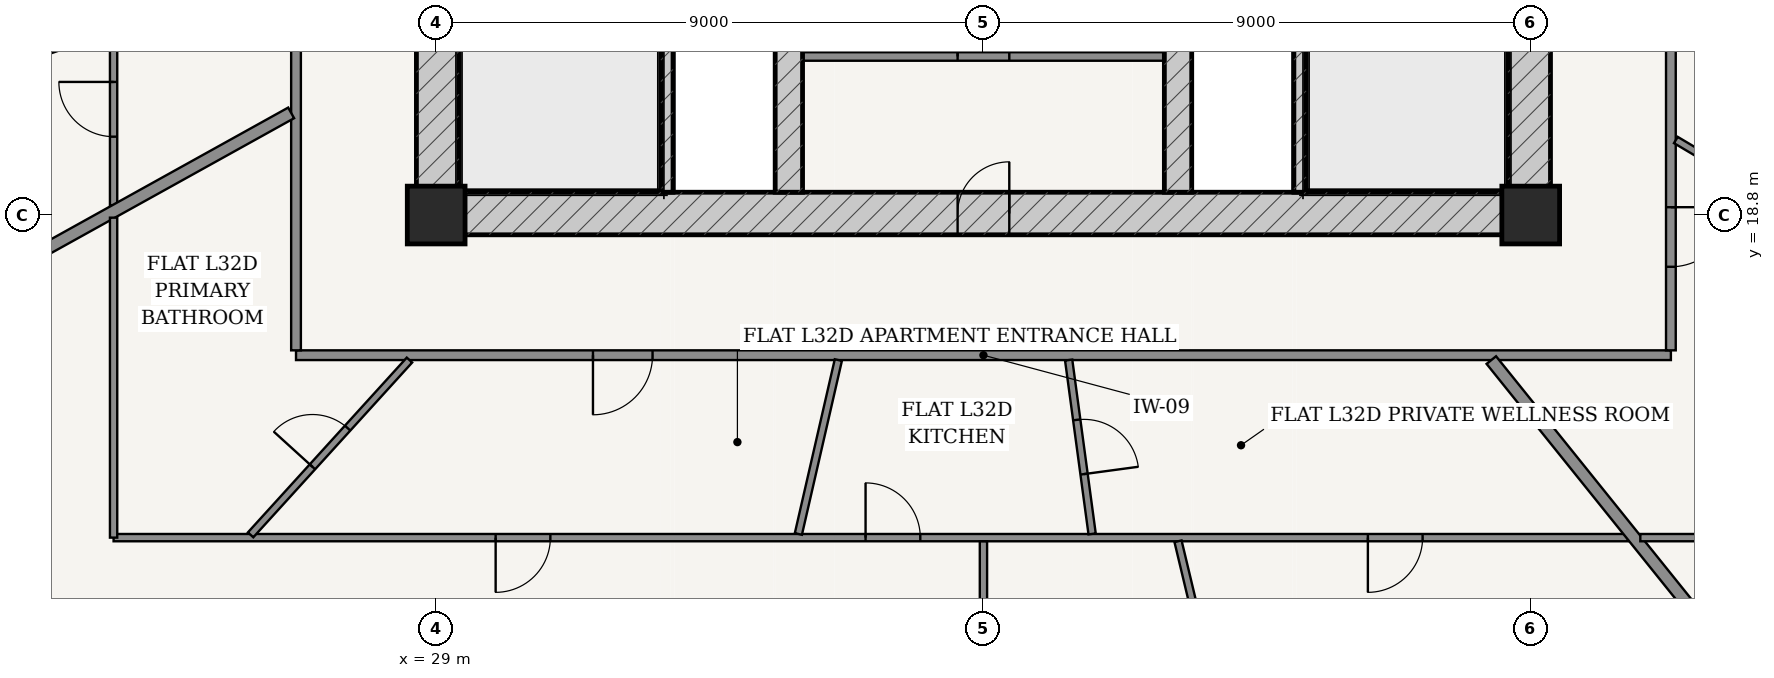
"""IFC4 building model, lengths in metres.
Left out: names, types, materials, properties, quantities, classifications, styles, units other than length and angle.
Written with IfcOpenShell. Run it as: python <this file> out.ifc"""

import sys

from ifc_helpers import new_model, si_unit, direction, frame, frame_2d, origin, origin_2d, place, context, subcontext, project, spatial, rectangle, extrude, source, transform, mapped, element, fill, save


model = new_model("IFC4")
c1 = context("Model", 3, precision=1e-05, world=origin(), true_north=direction((-0.2419218956, 0.970295726276)))
c2 = subcontext(c1, "Body", "Model", "MODEL_VIEW")
j1 = project(units=[si_unit("LENGTHUNIT", "METRE"), si_unit("PLANEANGLEUNIT", "RADIAN")], contexts=[c1])
p1 = place(None, origin())
s1 = spatial("IfcSite", under=j1, at=p1, CompositionType="ELEMENT")
p2 = place(p1, origin())
s2 = spatial("IfcBuilding", under=s1, at=p2, CompositionType="ELEMENT")
p3 = place(p2, frame((0.0, 0.0, 123.0)))
s3 = spatial("IfcBuildingStorey", under=s2, at=p3, CompositionType="ELEMENT", Elevation=123.0)
for number, where, z_axis, x_axis in (
    (1, (29.0, 18.8, 0.0), (0.0, 0.0, 1.0), (1.0, 0.0, 0.0)),
    (2, (47.0, 18.8, 0.0), (0.0, 0.0, 1.0), (1.0, 0.0, 0.0)),
):
    element("IfcColumn", number, at=place(p3, frame(where, z_axis=z_axis, x_axis=x_axis)), inside=s3, PredefinedType="COLUMN", context=c2, shape_type="SweptSolid", body=[
        extrude(rectangle(XDim=0.95, YDim=0.95, at=origin_2d()), origin(), (0.0, 0.0, 1.0), 3.6),
    ])
p4 = place(p3, frame((28.675, 18.825, 0.0), z_axis=(0.0, 0.0, 1.0), x_axis=(1.0, 0.0, 0.0)))
e3 = element("IfcWall", 3, at=p4, inside=s3, PredefinedType="SHEAR", context=c2, shape_type="SweptSolid", body=[
    extrude(rectangle(XDim=18.65, YDim=0.7, at=frame_2d((9.325, 0.0))), origin(), (0.0, 0.0, 1.0), 3.325),
])
p5 = place(p4, frame((8.9, 0.0, 0.0)))
e4 = element("IfcOpeningElement", 4, at=p5, cuts=e3, PredefinedType="OPENING", context=c2, shape_type="SweptSolid", body=[
    extrude(rectangle(XDim=0.85, YDim=2.1, at=frame_2d((0.425, 1.05))), frame((0.0, 0.36, 0.0), z_axis=(0.0, -1.0, 0.0), x_axis=(1.0, 0.0, 0.0)), (0.0, 0.0, 1.0), 0.72),
])
p6 = place(p3, frame((29.025, 19.175, 0.0), z_axis=(0.0, 0.0, 1.0), x_axis=(0.0, 1.0, 0.0)))
e5 = element("IfcWall", 5, at=p6, inside=s3, PredefinedType="SHEAR", context=c2, shape_type="SweptSolid", body=[
    extrude(rectangle(XDim=15.25, YDim=0.7, at=frame_2d((7.625, 0.0))), origin(), (0.0, 0.0, 1.0), 3.325),
])
p7 = place(p6, frame((9.875, 0.0, 0.0)))
e6 = element("IfcOpeningElement", 6, at=p7, cuts=e5, PredefinedType="OPENING", context=c2, shape_type="SweptSolid", body=[
    extrude(rectangle(XDim=1.5, YDim=2.2, at=frame_2d((0.75, 1.1))), frame((0.0, 0.36, 0.0), z_axis=(0.0, -1.0, 0.0), x_axis=(1.0, 0.0, 0.0)), (0.0, 0.0, 1.0), 0.72),
])
p8 = place(p3, frame((46.975, 19.175, 0.0), z_axis=(0.0, 0.0, 1.0), x_axis=(0.0, 1.0, 0.0)))
e7 = element("IfcWall", 7, at=p8, inside=s3, PredefinedType="SHEAR", context=c2, shape_type="SweptSolid", body=[
    extrude(rectangle(XDim=15.25, YDim=0.7, at=frame_2d((7.625, 0.0))), origin(), (0.0, 0.0, 1.0), 3.325),
])
p9 = place(p8, frame((9.875, 0.0, 0.0)))
e8 = element("IfcOpeningElement", 8, at=p9, cuts=e7, PredefinedType="OPENING", context=c2, shape_type="SweptSolid", body=[
    extrude(rectangle(XDim=1.5, YDim=2.2, at=frame_2d((0.75, 1.1))), frame((0.0, 0.36, 0.0), z_axis=(0.0, -1.0, 0.0), x_axis=(1.0, 0.0, 0.0)), (0.0, 0.0, 1.0), 0.72),
])
for number, where, z_axis, x_axis in (
    (9, (32.795, 19.175, 0.0), (0.0, 0.0, 1.0), (0.0, 1.0, 0.0)),
    (10, (43.205, 19.175, 0.0), (0.0, 0.0, 1.0), (0.0, 1.0, 0.0)),
):
    element("IfcWall", number, at=place(p3, frame(where, z_axis=z_axis, x_axis=x_axis)), inside=s3, PredefinedType="SOLIDWALL", context=c2, shape_type="SweptSolid", body=[
        extrude(rectangle(XDim=7.375, YDim=0.2, at=frame_2d((3.688, 0.0))), origin(), (0.0, 0.0, 1.0), 3.325),
    ])
p10 = place(p3, frame((34.8, 19.175, 0.0), z_axis=(0.0, 0.0, 1.0), x_axis=(0.0, 1.0, 0.0)))
e11 = element("IfcWall", 11, at=p10, inside=s3, PredefinedType="SHEAR", context=c2, shape_type="SweptSolid", body=[
    extrude(rectangle(XDim=15.25, YDim=0.45, at=frame_2d((7.625, 0.0))), origin(), (0.0, 0.0, 1.0), 3.325),
])
p11 = place(p10, frame((7.8, 0.0, 0.0)))
e12 = element("IfcOpeningElement", 12, at=p11, cuts=e11, PredefinedType="OPENING", context=c2, shape_type="SweptSolid", body=[
    extrude(rectangle(XDim=1.05, YDim=2.15, at=frame_2d((0.525, 1.075))), frame((0.0, 0.235, 0.0), z_axis=(0.0, -1.0, 0.0), x_axis=(1.0, 0.0, 0.0)), (0.0, 0.0, 1.0), 0.47),
])
p12 = place(p3, frame((41.2, 19.175, 0.0), z_axis=(0.0, 0.0, 1.0), x_axis=(0.0, 1.0, 0.0)))
e13 = element("IfcWall", 13, at=p12, inside=s3, PredefinedType="SHEAR", context=c2, shape_type="SweptSolid", body=[
    extrude(rectangle(XDim=15.25, YDim=0.45, at=frame_2d((7.625, 0.0))), origin(), (0.0, 0.0, 1.0), 3.325),
])
p13 = place(p12, frame((7.8, 0.0, 0.0)))
e14 = element("IfcOpeningElement", 14, at=p13, cuts=e13, PredefinedType="OPENING", context=c2, shape_type="SweptSolid", body=[
    extrude(rectangle(XDim=1.05, YDim=2.15, at=frame_2d((0.525, 1.075))), frame((0.0, 0.235, 0.0), z_axis=(0.0, -1.0, 0.0), x_axis=(1.0, 0.0, 0.0)), (0.0, 0.0, 1.0), 0.47),
])
p14 = place(p3, frame((15.846, 14.59, 0.0), z_axis=(0.0, 0.0, 1.0), x_axis=(0.769254958887, -0.638941944333, 0.0)))
e15 = element("IfcWall", 15, at=p14, inside=s3, PredefinedType="SOLIDWALL", context=c2, shape_type="SweptSolid", body=[
    extrude(rectangle(XDim=9.69, YDim=0.26, at=frame_2d((4.845, 0.0))), origin(), (0.0, 0.0, 1.0), 3.325),
])
p15 = place(p14, frame((4.17, 0.0, 0.0)))
e16 = element("IfcOpeningElement", 16, at=p15, cuts=e15, PredefinedType="OPENING", context=c2, shape_type="SweptSolid", body=[
    extrude(rectangle(XDim=1.35, YDim=2.2, at=frame_2d((0.675, 1.1))), frame((0.0, 0.14, 0.0), z_axis=(0.0, -1.0, 0.0), x_axis=(1.0, 0.0, 0.0)), (0.0, 0.0, 1.0), 0.28),
])
p16 = place(p3, frame((35.025, 21.407, 0.0), z_axis=(0.0, 0.0, 1.0), x_axis=(1.0, 0.0, 0.0)))
e17 = element("IfcWall", 17, at=p16, inside=s3, PredefinedType="PARTITIONING", context=c2, shape_type="SweptSolid", body=[
    extrude(rectangle(XDim=5.95, YDim=0.14, at=frame_2d((2.975, 0.0))), origin(), (0.0, 0.0, 1.0), 3.325),
])
p17 = place(p16, frame((2.55, 0.0, 0.0)))
e18 = element("IfcOpeningElement", 18, at=p17, cuts=e17, PredefinedType="OPENING", context=c2, shape_type="SweptSolid", body=[
    extrude(rectangle(XDim=0.85, YDim=2.1, at=frame_2d((0.425, 1.05))), frame((0.0, 0.08, 0.0), z_axis=(0.0, -1.0, 0.0), x_axis=(1.0, 0.0, 0.0)), (0.0, 0.0, 1.0), 0.16),
])
p18 = place(p3, frame((26.695, 16.495, 0.0), z_axis=(0.0, 0.0, 1.0), x_axis=(1.0, 0.0, 0.0)))
e19 = element("IfcWall", 19, at=p18, inside=s3, PredefinedType="PARTITIONING", context=c2, shape_type="SweptSolid", body=[
    extrude(rectangle(XDim=22.61, YDim=0.16, at=frame_2d((11.305, 0.0))), origin(), (0.0, 0.0, 1.0), 2.767),
])
p19 = place(p18, frame((4.883, 0.0, 0.0)))
e20 = element("IfcOpeningElement", 20, at=p19, cuts=e19, PredefinedType="OPENING", context=c2, shape_type="SweptSolid", body=[
    extrude(rectangle(XDim=0.98, YDim=2.2, at=frame_2d((0.49, 1.1))), frame((0.0, 0.09, 0.0), z_axis=(0.0, -1.0, 0.0), x_axis=(1.0, 0.0, 0.0)), (0.0, 0.0, 1.0), 0.18),
])
p20 = place(p3, frame((26.695, 16.575, 0.0), z_axis=(0.0, 0.0, 1.0), x_axis=(0.0, 1.0, 0.0)))
e21 = element("IfcWall", 21, at=p20, inside=s3, PredefinedType="PARTITIONING", context=c2, shape_type="SweptSolid", body=[
    extrude(rectangle(XDim=20.45, YDim=0.16, at=frame_2d((10.225, 0.0))), origin(), (0.0, 0.0, 1.0), 2.767),
])
p21 = place(p20, frame((9.547, 0.0, 0.0)))
e22 = element("IfcOpeningElement", 22, at=p21, cuts=e21, PredefinedType="OPENING", context=c2, shape_type="SweptSolid", body=[
    extrude(rectangle(XDim=0.98, YDim=2.2, at=frame_2d((0.49, 1.1))), frame((0.0, 0.09, 0.0), z_axis=(0.0, -1.0, 0.0), x_axis=(1.0, 0.0, 0.0)), (0.0, 0.0, 1.0), 0.18),
])
p22 = place(p3, frame((49.305, 16.575, 0.0), z_axis=(0.0, 0.0, 1.0), x_axis=(0.0, 1.0, 0.0)))
e23 = element("IfcWall", 23, at=p22, inside=s3, PredefinedType="PARTITIONING", context=c2, shape_type="SweptSolid", body=[
    extrude(rectangle(XDim=20.45, YDim=0.16, at=frame_2d((10.225, 0.0))), origin(), (0.0, 0.0, 1.0), 2.767),
])
p23 = place(p22, frame((17.66, 0.0, 0.0)))
e24 = element("IfcOpeningElement", 24, at=p23, cuts=e23, PredefinedType="OPENING", context=c2, shape_type="SweptSolid", body=[
    extrude(rectangle(XDim=0.98, YDim=2.2, at=frame_2d((0.49, 1.1))), frame((0.0, 0.09, 0.0), z_axis=(0.0, -1.0, 0.0), x_axis=(1.0, 0.0, 0.0)), (0.0, 0.0, 1.0), 0.18),
])
p24 = place(p22, frame((1.374, 0.0, 0.0)))
e25 = element("IfcOpeningElement", 25, at=p24, cuts=e23, PredefinedType="OPENING", context=c2, shape_type="SweptSolid", body=[
    extrude(rectangle(XDim=0.98, YDim=2.2, at=frame_2d((0.49, 1.1))), frame((0.0, 0.09, 0.0), z_axis=(0.0, -1.0, 0.0), x_axis=(1.0, 0.0, 0.0)), (0.0, 0.0, 1.0), 0.18),
])
p25 = place(p3, frame((23.695, 18.961, 0.0), z_axis=(0.0, 0.0, 1.0), x_axis=(0.0, 1.0, 0.0)))
e26 = element("IfcWall", 26, at=p25, inside=s3, PredefinedType="PARTITIONING", context=c2, shape_type="SweptSolid", body=[
    extrude(rectangle(XDim=15.679, YDim=0.12, at=frame_2d((7.839, 0.0))), origin(), (0.0, 0.0, 1.0), 2.767),
])
p26 = place(p25, frame((7.625, 0.0, 0.0)))
e27 = element("IfcOpeningElement", 27, at=p26, cuts=e26, PredefinedType="OPENING", context=c2, shape_type="SweptSolid", body=[
    extrude(rectangle(XDim=0.9, YDim=2.15, at=frame_2d((0.45, 1.075))), frame((0.0, 0.07, 0.0), z_axis=(0.0, -1.0, 0.0), x_axis=(1.0, 0.0, 0.0)), (0.0, 0.0, 1.0), 0.14),
])
p27 = place(p25, frame((1.128, 0.0, 0.0)))
e28 = element("IfcOpeningElement", 28, at=p27, cuts=e26, PredefinedType="OPENING", context=c2, shape_type="SweptSolid", body=[
    extrude(rectangle(XDim=0.9, YDim=2.15, at=frame_2d((0.45, 1.075))), frame((0.0, 0.07, 0.0), z_axis=(0.0, -1.0, 0.0), x_axis=(1.0, 0.0, 0.0)), (0.0, 0.0, 1.0), 0.14),
])
p28 = place(p3, frame((23.636, 21.857, 0.0), z_axis=(0.0, 0.0, 1.0), x_axis=(-0.945571197348, -0.325415289661, 0.0)))
e29 = element("IfcWall", 29, at=p28, inside=s3, PredefinedType="PARTITIONING", context=c2, shape_type="SweptSolid", body=[
    extrude(rectangle(XDim=10.737, YDim=0.12, at=frame_2d((5.368, 0.0))), origin(), (0.0, 0.0, 1.0), 2.767),
])
p29 = place(p28, frame((4.918, 0.0, 0.0)))
e30 = element("IfcOpeningElement", 30, at=p29, cuts=e29, PredefinedType="OPENING", context=c2, shape_type="SweptSolid", body=[
    extrude(rectangle(XDim=0.9, YDim=2.15, at=frame_2d((0.45, 1.075))), frame((0.0, 0.07, 0.0), z_axis=(0.0, -1.0, 0.0), x_axis=(1.0, 0.0, 0.0)), (0.0, 0.0, 1.0), 0.14),
])
p30 = place(p3, frame((26.615, 20.48, 0.0), z_axis=(0.0, 0.0, 1.0), x_axis=(-0.874310671773, -0.48536671623, 0.0)))
e31 = element("IfcWall", 31, at=p30, inside=s3, PredefinedType="PARTITIONING", context=c2, shape_type="SweptSolid", body=[
    extrude(rectangle(XDim=12.159, YDim=0.2, at=frame_2d((6.079, 0.0))), origin(), (0.0, 0.0, 1.0), 2.767),
])
p31 = place(p3, frame((48.598, 13.495, 0.0), z_axis=(0.0, 0.0, 1.0), x_axis=(-1.0, 0.0, 0.0)))
e32 = element("IfcWall", 32, at=p31, inside=s3, PredefinedType="PARTITIONING", context=c2, shape_type="SweptSolid", body=[
    extrude(rectangle(XDim=24.903, YDim=0.12, at=frame_2d((12.452, 0.0))), origin(), (0.0, 0.0, 1.0), 2.767),
])
p32 = place(p31, frame((17.72, 0.0, 0.0)))
e33 = element("IfcOpeningElement", 33, at=p32, cuts=e32, PredefinedType="OPENING", context=c2, shape_type="SweptSolid", body=[
    extrude(rectangle(XDim=0.9, YDim=2.15, at=frame_2d((0.45, 1.075))), frame((0.0, 0.07, 0.0), z_axis=(0.0, -1.0, 0.0), x_axis=(1.0, 0.0, 0.0)), (0.0, 0.0, 1.0), 0.14),
])
p33 = place(p31, frame((11.637, 0.0, 0.0)))
e34 = element("IfcOpeningElement", 34, at=p33, cuts=e32, PredefinedType="OPENING", context=c2, shape_type="SweptSolid", body=[
    extrude(rectangle(XDim=0.9, YDim=2.15, at=frame_2d((0.45, 1.075))), frame((0.0, 0.07, 0.0), z_axis=(0.0, -1.0, 0.0), x_axis=(1.0, 0.0, 0.0)), (0.0, 0.0, 1.0), 0.14),
])
p34 = place(p31, frame((3.376, 0.0, 0.0)))
e35 = element("IfcOpeningElement", 35, at=p34, cuts=e32, PredefinedType="OPENING", context=c2, shape_type="SweptSolid", body=[
    extrude(rectangle(XDim=0.9, YDim=2.15, at=frame_2d((0.45, 1.075))), frame((0.0, 0.07, 0.0), z_axis=(0.0, -1.0, 0.0), x_axis=(1.0, 0.0, 0.0)), (0.0, 0.0, 1.0), 0.14),
])
p35 = place(p3, frame((23.695, 13.495, 0.0), z_axis=(0.0, 0.0, 1.0), x_axis=(0.0, 1.0, 0.0)))
e36 = element("IfcWall", 36, at=p35, inside=s3, PredefinedType="PARTITIONING", context=c2, shape_type="SweptSolid", body=[
    extrude(rectangle(XDim=5.261, YDim=0.12, at=frame_2d((2.631, 0.0))), origin(), (0.0, 0.0, 1.0), 3.004),
])
p36 = place(p3, frame((38.0, 13.433, 0.0), z_axis=(0.0, 0.0, 1.0), x_axis=(0.0, -1.0, 0.0)))
e37 = element("IfcWall", 37, at=p36, inside=s3, PredefinedType="PARTITIONING", context=c2, shape_type="SweptSolid", body=[
    extrude(rectangle(XDim=8.673, YDim=0.12, at=frame_2d((4.336, 0.0))), origin(), (0.0, 0.0, 1.0), 2.767),
])
p37 = place(p36, frame((3.886, 0.0, 0.0)))
e38 = element("IfcOpeningElement", 38, at=p37, cuts=e37, PredefinedType="OPENING", context=c2, shape_type="SweptSolid", body=[
    extrude(rectangle(XDim=0.9, YDim=2.15, at=frame_2d((0.45, 1.075))), frame((0.0, 0.07, 0.0), z_axis=(0.0, -1.0, 0.0), x_axis=(1.0, 0.0, 0.0)), (0.0, 0.0, 1.0), 0.14),
])
p38 = place(p3, frame((41.2, 13.435, 0.0), z_axis=(0.0, 0.0, 1.0), x_axis=(0.232814779051, -0.972521094196, 0.0)))
e39 = element("IfcWall", 39, at=p38, inside=s3, PredefinedType="PARTITIONING", context=c2, shape_type="SweptSolid", body=[
    extrude(rectangle(XDim=8.438, YDim=0.12, at=frame_2d((4.219, 0.0))), origin(), (0.0, 0.0, 1.0), 2.767),
])
p39 = place(p3, frame((28.561, 16.415, 0.0), z_axis=(0.0, 0.0, 1.0), x_axis=(-0.672578928456, -0.740025394833, 0.0)))
e40 = element("IfcWall", 40, at=p39, inside=s3, PredefinedType="PARTITIONING", context=c2, shape_type="SweptSolid", body=[
    extrude(rectangle(XDim=3.884, YDim=0.12, at=frame_2d((1.942, 0.0))), origin(), (0.0, 0.0, 1.0), 2.767),
])
p40 = place(p39, frame((1.512, 0.0, 0.0)))
e41 = element("IfcOpeningElement", 41, at=p40, cuts=e40, PredefinedType="OPENING", context=c2, shape_type="SweptSolid", body=[
    extrude(rectangle(XDim=0.86, YDim=2.15, at=frame_2d((0.43, 1.075))), frame((0.0, 0.07, 0.0), z_axis=(0.0, -1.0, 0.0), x_axis=(1.0, 0.0, 0.0)), (0.0, 0.0, 1.0), 0.14),
])
p41 = place(p3, frame((35.614, 16.415, 0.0), z_axis=(0.0, 0.0, 1.0), x_axis=(-0.223911395669, -0.974609504822, 0.0)))
e42 = element("IfcWall", 42, at=p41, inside=s3, PredefinedType="PARTITIONING", context=c2, shape_type="SweptSolid", body=[
    extrude(rectangle(XDim=2.934, YDim=0.12, at=frame_2d((1.467, 0.0))), origin(), (0.0, 0.0, 1.0), 2.767),
])
p42 = place(p3, frame((39.401, 16.415, 0.0), z_axis=(0.0, 0.0, 1.0), x_axis=(0.133726943496, -0.99101821607, 0.0)))
e43 = element("IfcWall", 43, at=p42, inside=s3, PredefinedType="PARTITIONING", context=c2, shape_type="SweptSolid", body=[
    extrude(rectangle(XDim=2.885, YDim=0.12, at=frame_2d((1.442, 0.0))), origin(), (0.0, 0.0, 1.0), 3.325),
])
p43 = place(p42, frame((0.992, 0.0, 0.0)))
e44 = element("IfcOpeningElement", 44, at=p43, cuts=e43, PredefinedType="OPENING", context=c2, shape_type="SweptSolid", body=[
    extrude(rectangle(XDim=0.9, YDim=2.15, at=frame_2d((0.45, 1.075))), frame((0.0, 0.07, 0.0), z_axis=(0.0, -1.0, 0.0), x_axis=(1.0, 0.0, 0.0)), (0.0, 0.0, 1.0), 0.14),
])
p44 = place(p3, frame((46.352, 16.415, 0.0), z_axis=(0.0, 0.0, 1.0), x_axis=(0.626701127389, -0.779259710834, 0.0)))
e45 = element("IfcWall", 45, at=p44, inside=s3, PredefinedType="PARTITIONING", context=c2, shape_type="SweptSolid", body=[
    extrude(rectangle(XDim=10.141, YDim=0.2, at=frame_2d((5.071, 0.0))), origin(), (0.0, 0.0, 1.0), 2.767),
])
p45 = place(p3, frame((52.305, 13.495, 0.0), z_axis=(0.0, 0.0, 1.0), x_axis=(-1.0, 0.0, 0.0)))
e46 = element("IfcWall", 46, at=p45, inside=s3, PredefinedType="PARTITIONING", context=c2, shape_type="SweptSolid", body=[
    extrude(rectangle(XDim=3.503, YDim=0.12, at=frame_2d((1.751, 0.0))), origin(), (0.0, 0.0, 1.0), 2.767),
])
p46 = place(p3, frame((49.387, 20.034, 0.0), z_axis=(0.0, 0.0, 1.0), x_axis=(0.859682842925, -0.510828160521, 0.0)))
e47 = element("IfcWall", 47, at=p46, inside=s3, PredefinedType="PARTITIONING", context=c2, shape_type="SweptSolid", body=[
    extrude(rectangle(XDim=3.333, YDim=0.12, at=frame_2d((1.666, 0.0))), origin(), (0.0, 0.0, 1.0), 3.325),
])
p47 = place(p46, frame((1.236, 0.0, 0.0)))
e48 = element("IfcOpeningElement", 48, at=p47, cuts=e47, PredefinedType="OPENING", context=c2, shape_type="SweptSolid", body=[
    extrude(rectangle(XDim=0.86, YDim=2.15, at=frame_2d((0.43, 1.075))), frame((0.0, 0.07, 0.0), z_axis=(0.0, -1.0, 0.0), x_axis=(1.0, 0.0, 0.0)), (0.0, 0.0, 1.0), 0.14),
])
m1 = source(origin(), c2, "Body", "SweptSolid", [
    extrude(rectangle(XDim=0.85, YDim=2.1, at=frame_2d((0.425, 1.05))), frame((0.0, 0.025, 0.0), z_axis=(0.0, -1.0, 0.0), x_axis=(1.0, 0.0, 0.0)), (0.0, 0.0, 1.0), 0.05),
])
p48 = place(p5, origin())
e49 = element("IfcDoor", 49, at=p48, inside=s3, OperationType="SINGLE_SWING_RIGHT", PredefinedType="DOOR", context=c2, shape_type="MappedRepresentation", body=[
    mapped(m1, transform((0.0, 0.0, 0.0), scale=1.0)),
])
fill(e4, e49)
p49 = place(p17, origin())
e50 = element("IfcDoor", 50, at=p49, inside=s3, OperationType="SINGLE_SWING_LEFT", PredefinedType="DOOR", context=c2, shape_type="MappedRepresentation", body=[
    mapped(m1, transform((0.0, 0.0, 0.0), scale=1.0)),
])
fill(e18, e50)
m2 = source(origin(), c2, "Body", "SweptSolid", [
    extrude(rectangle(XDim=0.9, YDim=2.15, at=frame_2d((0.45, 1.075))), frame((0.0, 0.025, 0.0), z_axis=(0.0, -1.0, 0.0), x_axis=(1.0, 0.0, 0.0)), (0.0, 0.0, 1.0), 0.05),
])
p50 = place(p27, origin())
e51 = element("IfcDoor", 51, at=p50, inside=s3, OperationType="SINGLE_SWING_RIGHT", PredefinedType="DOOR", context=c2, shape_type="MappedRepresentation", body=[
    mapped(m2, transform((0.0, 0.0, 0.0), scale=1.0)),
])
fill(e28, e51)
m3 = source(origin(), c2, "Body", "SweptSolid", [
    extrude(rectangle(XDim=0.98, YDim=2.2, at=frame_2d((0.49, 1.1))), frame((0.0, 0.025, 0.0), z_axis=(0.0, -1.0, 0.0), x_axis=(1.0, 0.0, 0.0)), (0.0, 0.0, 1.0), 0.05),
])
p51 = place(p19, frame((0.98, 0.0, 0.0), z_axis=(0.0, 0.0, 1.0), x_axis=(-1.0, 0.0, 0.0)))
e52 = element("IfcDoor", 52, at=p51, inside=s3, OperationType="SINGLE_SWING_RIGHT", PredefinedType="DOOR", context=c2, shape_type="MappedRepresentation", body=[
    mapped(m3, transform((0.0, 0.0, 0.0), scale=1.0)),
])
fill(e20, e52)
m4 = source(origin(), c2, "Body", "SweptSolid", [
    extrude(rectangle(XDim=0.86, YDim=2.15, at=frame_2d((0.43, 1.075))), frame((0.0, 0.025, 0.0), z_axis=(0.0, -1.0, 0.0), x_axis=(1.0, 0.0, 0.0)), (0.0, 0.0, 1.0), 0.05),
])
p52 = place(p40, frame((0.86, 0.0, 0.0), z_axis=(0.0, 0.0, 1.0), x_axis=(-1.0, 0.0, 0.0)))
e53 = element("IfcDoor", 53, at=p52, inside=s3, OperationType="SINGLE_SWING_LEFT", PredefinedType="DOOR", context=c2, shape_type="MappedRepresentation", body=[
    mapped(m4, transform((0.0, 0.0, 0.0), scale=1.0)),
])
fill(e41, e53)
p53 = place(p32, origin())
e54 = element("IfcDoor", 54, at=p53, inside=s3, OperationType="SINGLE_SWING_RIGHT", PredefinedType="DOOR", context=c2, shape_type="MappedRepresentation", body=[
    mapped(m2, transform((0.0, 0.0, 0.0), scale=1.0)),
])
fill(e33, e54)
p54 = place(p33, frame((0.9, 0.0, 0.0), z_axis=(0.0, 0.0, 1.0), x_axis=(-1.0, 0.0, 0.0)))
e55 = element("IfcDoor", 55, at=p54, inside=s3, OperationType="SINGLE_SWING_LEFT", PredefinedType="DOOR", context=c2, shape_type="MappedRepresentation", body=[
    mapped(m2, transform((0.0, 0.0, 0.0), scale=1.0)),
])
fill(e34, e55)
p55 = place(p43, origin())
e56 = element("IfcDoor", 56, at=p55, inside=s3, OperationType="SINGLE_SWING_RIGHT", PredefinedType="DOOR", context=c2, shape_type="MappedRepresentation", body=[
    mapped(m2, transform((0.0, 0.0, 0.0), scale=1.0)),
])
fill(e44, e56)
p56 = place(p34, origin())
e57 = element("IfcDoor", 57, at=p56, inside=s3, OperationType="SINGLE_SWING_RIGHT", PredefinedType="DOOR", context=c2, shape_type="MappedRepresentation", body=[
    mapped(m2, transform((0.0, 0.0, 0.0), scale=1.0)),
])
fill(e35, e57)
p57 = place(p24, frame((0.98, 0.0, 0.0), z_axis=(0.0, 0.0, 1.0), x_axis=(-1.0, 0.0, 0.0)))
e58 = element("IfcDoor", 58, at=p57, inside=s3, OperationType="SINGLE_SWING_LEFT", PredefinedType="DOOR", context=c2, shape_type="MappedRepresentation", body=[
    mapped(m3, transform((0.0, 0.0, 0.0), scale=1.0)),
])
fill(e25, e58)
save(model, sys.argv[1])
